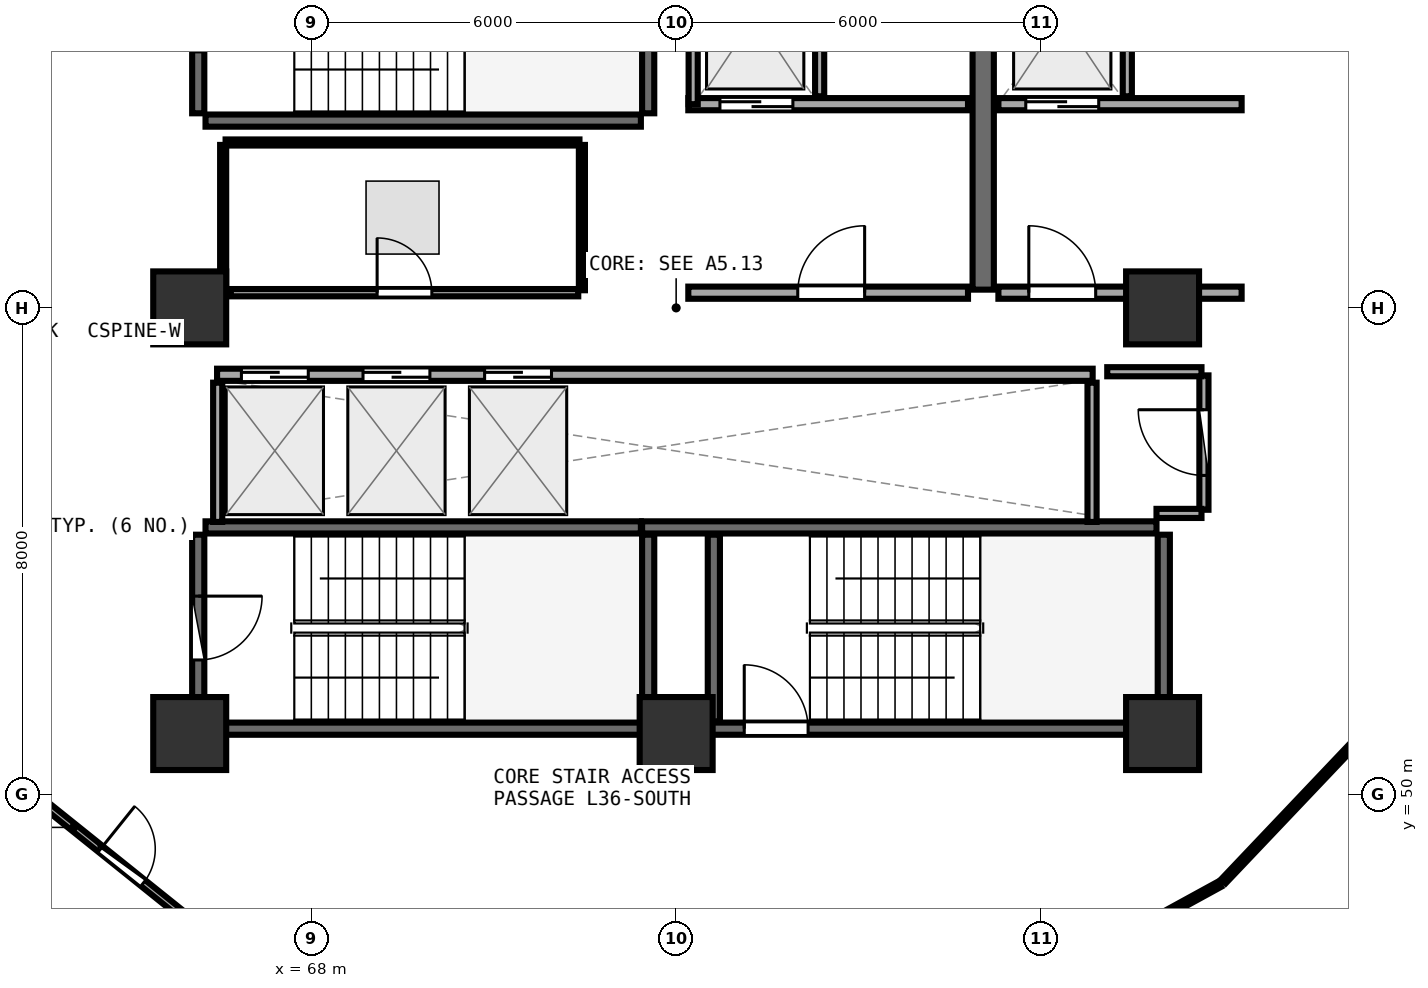
"""IFC4 building model, lengths in metres.
Left out: names, types, materials, properties, quantities, classifications, styles, units other than length and angle.
Written with IfcOpenShell. Run it as: python <this file> out.ifc"""

import sys

from ifc_helpers import new_model, si_unit, direction, frame, frame_2d, origin, origin_2d, place, context, subcontext, project, spatial, rectangle, extrude, element, fill, save


model = new_model("IFC4")
c1 = context("Model", 3, precision=1e-05, world=origin(), true_north=direction((0.0, 1.0)))
c2 = subcontext(c1, "Body", "Model", "MODEL_VIEW")
j1 = project(units=[si_unit("LENGTHUNIT", "METRE"), si_unit("PLANEANGLEUNIT", "RADIAN")], contexts=[c1])
p1 = place(None, origin())
s1 = spatial("IfcSite", under=j1, at=p1, CompositionType="ELEMENT")
p2 = place(p1, origin())
s2 = spatial("IfcBuilding", under=s1, at=p2, CompositionType="ELEMENT")
p3 = place(p2, frame((0.0, 0.0, 143.1)))
s3 = spatial("IfcBuildingStorey", under=s2, at=p3, CompositionType="ELEMENT", Elevation=143.1)
for number, where, z_axis, x_axis in (
    (1, (66.0, 51.0, 0.0), (0.0, 0.0, 1.0), (1.0, 0.0, 0.0)),
    (2, (74.0, 51.0, 0.0), (0.0, 0.0, 1.0), (1.0, 0.0, 0.0)),
    (3, (82.0, 51.0, 0.0), (0.0, 0.0, 1.0), (1.0, 0.0, 0.0)),
    (4, (82.0, 58.0, 0.0), (0.0, 0.0, 1.0), (1.0, 0.0, 0.0)),
    (5, (66.0, 58.0, 0.0), (0.0, 0.0, 1.0), (1.0, 0.0, 0.0)),
):
    element("IfcColumn", number, at=place(p3, frame(where, z_axis=z_axis, x_axis=x_axis)), inside=s3, PredefinedType="PILASTER", context=c2, shape_type="SweptSolid", body=[
        extrude(rectangle(XDim=1.2, YDim=1.2, at=origin_2d()), origin(), (0.0, 0.0, 1.0), 3.75),
    ])
p4 = place(p3, frame((66.26, 61.08, 0.0), z_axis=(0.0, 0.0, 1.0), x_axis=(1.0, 0.0, 0.0)))
e6 = element("IfcWall", 6, at=p4, inside=s3, PredefinedType="SHEAR", context=c2, shape_type="SweptSolid", body=[
    extrude(rectangle(XDim=7.16, YDim=0.2, at=frame_2d((3.58, 0.0))), origin(), (0.0, 0.0, 1.0), 3.49),
])
p5 = place(p3, frame((73.54, 61.2, 0.0), z_axis=(0.0, 0.0, 1.0), x_axis=(0.0, 1.0, 0.0)))
e7 = element("IfcWall", 7, at=p5, inside=s3, PredefinedType="SHEAR", context=c2, shape_type="SweptSolid", body=[
    extrude(rectangle(XDim=3.07, YDim=0.2, at=frame_2d((1.535, 0.0))), origin(), (0.0, 0.0, 1.0), 3.49),
])
p6 = place(p3, frame((66.14, 64.27, 0.0), z_axis=(0.0, 0.0, 1.0), x_axis=(0.0, -1.0, 0.0)))
e8 = element("IfcWall", 8, at=p6, inside=s3, PredefinedType="SHEAR", context=c2, shape_type="SweptSolid", body=[
    extrude(rectangle(XDim=3.07, YDim=0.2, at=frame_2d((1.535, 0.0))), origin(), (0.0, 0.0, 1.0), 3.49),
])
p7 = place(p6, frame((1.01, 0.0, 0.0)))
e9 = element("IfcOpeningElement", 9, at=p7, cuts=e8, PredefinedType="OPENING", context=c2, shape_type="SweptSolid", body=[
    extrude(rectangle(XDim=1.05, YDim=2.1, at=frame_2d((0.525, 1.05))), frame((0.0, 0.11, 0.0), z_axis=(0.0, -1.0, 0.0), x_axis=(1.0, 0.0, 0.0)), (0.0, 0.0, 1.0), 0.22),
])
p8 = place(p3, frame((74.0, 51.08, 0.0), z_axis=(0.0, 0.0, 1.0), x_axis=(1.0, 0.0, 0.0)))
e10 = element("IfcWall", 10, at=p8, inside=s3, PredefinedType="SHEAR", context=c2, shape_type="SweptSolid", body=[
    extrude(rectangle(XDim=7.9, YDim=0.2, at=frame_2d((3.95, 0.0))), origin(), (0.0, 0.0, 1.0), 3.49),
])
p9 = place(p8, frame((1.12, 0.0, 0.0)))
e11 = element("IfcOpeningElement", 11, at=p9, cuts=e10, PredefinedType="OPENING", context=c2, shape_type="SweptSolid", body=[
    extrude(rectangle(XDim=1.05, YDim=2.1, at=frame_2d((0.525, 1.05))), frame((0.0, 0.11, 0.0), z_axis=(0.0, -1.0, 0.0), x_axis=(1.0, 0.0, 0.0)), (0.0, 0.0, 1.0), 0.22),
])
p10 = place(p3, frame((82.02, 51.2, 0.0), z_axis=(0.0, 0.0, 1.0), x_axis=(0.0, 1.0, 0.0)))
e12 = element("IfcWall", 12, at=p10, inside=s3, PredefinedType="SHEAR", context=c2, shape_type="SweptSolid", body=[
    extrude(rectangle(XDim=3.07, YDim=0.2, at=frame_2d((1.535, 0.0))), origin(), (0.0, 0.0, 1.0), 3.49),
])
p11 = place(p3, frame((81.9, 54.39, 0.0), z_axis=(0.0, 0.0, 1.0), x_axis=(-1.0, 0.0, 0.0)))
e13 = element("IfcWall", 13, at=p11, inside=s3, PredefinedType="SHEAR", context=c2, shape_type="SweptSolid", body=[
    extrude(rectangle(XDim=8.46, YDim=0.2, at=frame_2d((4.23, 0.0))), origin(), (0.0, 0.0, 1.0), 3.49),
])
p12 = place(p3, frame((74.62, 54.27, 0.0), z_axis=(0.0, 0.0, 1.0), x_axis=(0.0, -1.0, 0.0)))
e14 = element("IfcWall", 14, at=p12, inside=s3, PredefinedType="SHEAR", context=c2, shape_type="SweptSolid", body=[
    extrude(rectangle(XDim=3.07, YDim=0.2, at=frame_2d((1.535, 0.0))), origin(), (0.0, 0.0, 1.0), 3.49),
])
p13 = place(p3, frame((66.26, 51.08, 0.0), z_axis=(0.0, 0.0, 1.0), x_axis=(1.0, 0.0, 0.0)))
e15 = element("IfcWall", 15, at=p13, inside=s3, PredefinedType="SHEAR", context=c2, shape_type="SweptSolid", body=[
    extrude(rectangle(XDim=7.16, YDim=0.2, at=frame_2d((3.58, 0.0))), origin(), (0.0, 0.0, 1.0), 3.49),
])
p14 = place(p3, frame((73.54, 51.2, 0.0), z_axis=(0.0, 0.0, 1.0), x_axis=(0.0, 1.0, 0.0)))
e16 = element("IfcWall", 16, at=p14, inside=s3, PredefinedType="SHEAR", context=c2, shape_type="SweptSolid", body=[
    extrude(rectangle(XDim=3.07, YDim=0.2, at=frame_2d((1.535, 0.0))), origin(), (0.0, 0.0, 1.0), 3.49),
])
p15 = place(p3, frame((73.42, 54.39, 0.0), z_axis=(0.0, 0.0, 1.0), x_axis=(-1.0, 0.0, 0.0)))
e17 = element("IfcWall", 17, at=p15, inside=s3, PredefinedType="SHEAR", context=c2, shape_type="SweptSolid", body=[
    extrude(rectangle(XDim=7.16, YDim=0.2, at=frame_2d((3.58, 0.0))), origin(), (0.0, 0.0, 1.0), 3.49),
])
p16 = place(p3, frame((66.14, 54.27, 0.0), z_axis=(0.0, 0.0, 1.0), x_axis=(0.0, -1.0, 0.0)))
e18 = element("IfcWall", 18, at=p16, inside=s3, PredefinedType="SHEAR", context=c2, shape_type="SweptSolid", body=[
    extrude(rectangle(XDim=3.07, YDim=0.2, at=frame_2d((1.535, 0.0))), origin(), (0.0, 0.0, 1.0), 3.49),
])
p17 = place(p16, frame((1.01, 0.0, 0.0)))
e19 = element("IfcOpeningElement", 19, at=p17, cuts=e18, PredefinedType="OPENING", context=c2, shape_type="SweptSolid", body=[
    extrude(rectangle(XDim=1.05, YDim=2.1, at=frame_2d((0.525, 1.05))), frame((0.0, 0.11, 0.0), z_axis=(0.0, -1.0, 0.0), x_axis=(1.0, 0.0, 0.0)), (0.0, 0.0, 1.0), 0.22),
])
p18 = place(p3, frame((79.05, 58.3, 0.0), z_axis=(0.0, 0.0, 1.0), x_axis=(0.0, 1.0, 0.0)))
e20 = element("IfcWall", 20, at=p18, inside=s3, PredefinedType="SHEAR", context=c2, shape_type="SweptSolid", body=[
    extrude(rectangle(XDim=6.3, YDim=0.35, at=frame_2d((3.15, 0.0))), origin(), (0.0, 0.0, 1.0), 3.49),
])
p19 = place(p3, frame((74.2, 61.35, 0.0), z_axis=(0.0, 0.0, 1.0), x_axis=(1.0, 0.0, 0.0)))
e21 = element("IfcWall", 21, at=p19, inside=s3, PredefinedType="SOLIDWALL", context=c2, shape_type="SweptSolid", body=[
    extrude(rectangle(XDim=4.6, YDim=0.2, at=frame_2d((2.3, 0.0))), origin(), (0.0, 0.0, 1.0), 3.48),
])
p20 = place(p19, frame((0.52, 0.0, 0.0)))
e22 = element("IfcOpeningElement", 22, at=p20, cuts=e21, PredefinedType="OPENING", context=c2, shape_type="SweptSolid", body=[
    extrude(rectangle(XDim=1.2, YDim=2.15, at=frame_2d((0.6, 1.075))), frame((0.0, 0.11, 0.0), z_axis=(0.0, -1.0, 0.0), x_axis=(1.0, 0.0, 0.0)), (0.0, 0.0, 1.0), 0.22),
])
p21 = place(p3, frame((74.28, 61.35, 0.0), z_axis=(0.0, 0.0, 1.0), x_axis=(0.0, 1.0, 0.0)))
e23 = element("IfcWall", 23, at=p21, inside=s3, PredefinedType="PARTITIONING", context=c2, shape_type="SweptSolid", body=[
    extrude(rectangle(XDim=2.97, YDim=0.15, at=frame_2d((1.485, 0.0))), origin(), (0.0, 0.0, 1.0), 3.48),
])
p22 = place(p3, frame((76.36, 61.48, 0.0), z_axis=(0.0, 0.0, 1.0), x_axis=(0.0, 1.0, 0.0)))
e24 = element("IfcWall", 24, at=p22, inside=s3, PredefinedType="PARTITIONING", context=c2, shape_type="SweptSolid", body=[
    extrude(rectangle(XDim=2.84, YDim=0.15, at=frame_2d((1.42, 0.0))), origin(), (0.0, 0.0, 1.0), 3.48),
])
p23 = place(p3, frame((79.3, 61.35, 0.0), z_axis=(0.0, 0.0, 1.0), x_axis=(1.0, 0.0, 0.0)))
e25 = element("IfcWall", 25, at=p23, inside=s3, PredefinedType="SOLIDWALL", context=c2, shape_type="SweptSolid", body=[
    extrude(rectangle(XDim=4.0, YDim=0.2, at=frame_2d((2.0, 0.0))), origin(), (0.0, 0.0, 1.0), 2.775),
])
p24 = place(p23, frame((0.45, 0.0, 0.0)))
e26 = element("IfcOpeningElement", 26, at=p24, cuts=e25, PredefinedType="OPENING", context=c2, shape_type="SweptSolid", body=[
    extrude(rectangle(XDim=1.2, YDim=2.15, at=frame_2d((0.6, 1.075))), frame((0.0, 0.11, 0.0), z_axis=(0.0, -1.0, 0.0), x_axis=(1.0, 0.0, 0.0)), (0.0, 0.0, 1.0), 0.22),
])
p25 = place(p3, frame((81.42, 61.48, 0.0), z_axis=(0.0, 0.0, 1.0), x_axis=(0.0, 1.0, 0.0)))
e27 = element("IfcWall", 27, at=p25, inside=s3, PredefinedType="PARTITIONING", context=c2, shape_type="SweptSolid", body=[
    extrude(rectangle(XDim=2.84, YDim=0.15, at=frame_2d((1.42, 0.0))), origin(), (0.0, 0.0, 1.0), 3.48),
])
p26 = place(p3, frame((74.2, 58.25, 0.0), z_axis=(0.0, 0.0, 1.0), x_axis=(1.0, 0.0, 0.0)))
e28 = element("IfcWall", 28, at=p26, inside=s3, PredefinedType="SOLIDWALL", context=c2, shape_type="SweptSolid", body=[
    extrude(rectangle(XDim=4.6, YDim=0.2, at=frame_2d((2.3, 0.0))), origin(), (0.0, 0.0, 1.0), 3.48),
])
p27 = place(p26, frame((1.8, 0.0, 0.0)))
e29 = element("IfcOpeningElement", 29, at=p27, cuts=e28, PredefinedType="OPENING", context=c2, shape_type="SweptSolid", body=[
    extrude(rectangle(XDim=1.1, YDim=2.1, at=frame_2d((0.55, 1.05))), frame((0.0, 0.11, 0.0), z_axis=(0.0, -1.0, 0.0), x_axis=(1.0, 0.0, 0.0)), (0.0, 0.0, 1.0), 0.22),
])
p28 = place(p3, frame((79.3, 58.25, 0.0), z_axis=(0.0, 0.0, 1.0), x_axis=(1.0, 0.0, 0.0)))
e30 = element("IfcWall", 30, at=p28, inside=s3, PredefinedType="SOLIDWALL", context=c2, shape_type="SweptSolid", body=[
    extrude(rectangle(XDim=4.0, YDim=0.2, at=frame_2d((2.0, 0.0))), origin(), (0.0, 0.0, 1.0), 2.775),
])
p29 = place(p28, frame((0.5, 0.0, 0.0)))
e31 = element("IfcOpeningElement", 31, at=p29, cuts=e30, PredefinedType="OPENING", context=c2, shape_type="SweptSolid", body=[
    extrude(rectangle(XDim=1.1, YDim=2.1, at=frame_2d((0.55, 1.05))), frame((0.0, 0.11, 0.0), z_axis=(0.0, -1.0, 0.0), x_axis=(1.0, 0.0, 0.0)), (0.0, 0.0, 1.0), 0.22),
])
p30 = place(p3, frame((66.45, 56.9, 0.0), z_axis=(0.0, 0.0, 1.0), x_axis=(1.0, 0.0, 0.0)))
e32 = element("IfcWall", 32, at=p30, inside=s3, PredefinedType="SOLIDWALL", context=c2, shape_type="SweptSolid", body=[
    extrude(rectangle(XDim=14.4, YDim=0.2, at=frame_2d((7.2, 0.0))), origin(), (0.0, 0.0, 1.0), 3.48),
])
p31 = place(p30, frame((0.4, 0.0, 0.0)))
e33 = element("IfcOpeningElement", 33, at=p31, cuts=e32, PredefinedType="OPENING", context=c2, shape_type="SweptSolid", body=[
    extrude(rectangle(XDim=1.1, YDim=2.1, at=frame_2d((0.55, 1.05))), frame((0.0, 0.11, 0.0), z_axis=(0.0, -1.0, 0.0), x_axis=(1.0, 0.0, 0.0)), (0.0, 0.0, 1.0), 0.22),
])
p32 = place(p30, frame((2.4, 0.0, 0.0)))
e34 = element("IfcOpeningElement", 34, at=p32, cuts=e32, PredefinedType="OPENING", context=c2, shape_type="SweptSolid", body=[
    extrude(rectangle(XDim=1.1, YDim=2.1, at=frame_2d((0.55, 1.05))), frame((0.0, 0.11, 0.0), z_axis=(0.0, -1.0, 0.0), x_axis=(1.0, 0.0, 0.0)), (0.0, 0.0, 1.0), 0.22),
])
p33 = place(p30, frame((4.4, 0.0, 0.0)))
e35 = element("IfcOpeningElement", 35, at=p33, cuts=e32, PredefinedType="OPENING", context=c2, shape_type="SweptSolid", body=[
    extrude(rectangle(XDim=1.1, YDim=2.1, at=frame_2d((0.55, 1.05))), frame((0.0, 0.11, 0.0), z_axis=(0.0, -1.0, 0.0), x_axis=(1.0, 0.0, 0.0)), (0.0, 0.0, 1.0), 0.22),
])
for number, where, z_axis, x_axis in (
    (36, (66.46, 54.48, 0.0), (0.0, 0.0, 1.0), (0.0, 1.0, 0.0)),
    (37, (80.84, 54.48, 0.0), (0.0, 0.0, 1.0), (0.0, 1.0, 0.0)),
):
    element("IfcWall", number, at=place(p3, frame(where, z_axis=z_axis, x_axis=x_axis)), inside=s3, PredefinedType="PARTITIONING", context=c2, shape_type="SweptSolid", body=[
        extrude(rectangle(XDim=2.29, YDim=0.15, at=frame_2d((1.145, 0.0))), origin(), (0.0, 0.0, 1.0), 3.48),
    ])
p34 = place(p3, frame((82.68, 54.68, 0.0), z_axis=(0.0, 0.0, 1.0), x_axis=(0.0, 1.0, 0.0)))
e38 = element("IfcWall", 38, at=p34, inside=s3, PredefinedType="PARTITIONING", context=c2, shape_type="SweptSolid", body=[
    extrude(rectangle(XDim=2.21, YDim=0.15, at=frame_2d((1.105, 0.0))), origin(), (0.0, 0.0, 1.0), 3.48),
])
p35 = place(p34, frame((0.565, 0.0, 0.0)))
e39 = element("IfcOpeningElement", 39, at=p35, cuts=e38, PredefinedType="OPENING", context=c2, shape_type="SweptSolid", body=[
    extrude(rectangle(XDim=1.08, YDim=2.1, at=frame_2d((0.54, 1.05))), frame((0.0, 0.085, 0.0), z_axis=(0.0, -1.0, 0.0), x_axis=(1.0, 0.0, 0.0)), (0.0, 0.0, 1.0), 0.17),
])
p36 = place(p3, frame((66.675, 58.25, 0.0), z_axis=(0.0, 0.0, 1.0), x_axis=(1.0, 0.0, 0.0)))
e40 = element("IfcWall", 40, at=p36, inside=s3, PredefinedType="PARTITIONING", context=c2, shape_type="SweptSolid", body=[
    extrude(rectangle(XDim=5.715, YDim=0.12, at=frame_2d((2.857, 0.0))), origin(), (0.0, 0.0, 1.0), 3.48),
])
p37 = place(p36, frame((2.407, 0.0, 0.0)))
e41 = element("IfcOpeningElement", 41, at=p37, cuts=e40, PredefinedType="OPENING", context=c2, shape_type="SweptSolid", body=[
    extrude(rectangle(XDim=0.9, YDim=2.08, at=frame_2d((0.45, 1.04))), frame((0.0, 0.07, 0.0), z_axis=(0.0, -1.0, 0.0), x_axis=(1.0, 0.0, 0.0)), (0.0, 0.0, 1.0), 0.14),
])
p38 = place(p3, frame((63.468, 49.957, 0.0), z_axis=(0.0, 0.0, 1.0), x_axis=(0.78006790059, -0.625694870099, 0.0)))
e42 = element("IfcWall", 42, at=p38, inside=s3, PredefinedType="PARTITIONING", context=c2, shape_type="SweptSolid", body=[
    extrude(rectangle(XDim=3.631, YDim=0.12, at=frame_2d((1.815, 0.0))), origin(), (0.0, 0.0, 1.0), 2.975),
])
p39 = place(p38, frame((1.366, 0.0, 0.0)))
e43 = element("IfcOpeningElement", 43, at=p39, cuts=e42, PredefinedType="OPENING", context=c2, shape_type="SweptSolid", body=[
    extrude(rectangle(XDim=0.9, YDim=2.08, at=frame_2d((0.45, 1.04))), frame((0.0, 0.07, 0.0), z_axis=(0.0, -1.0, 0.0), x_axis=(1.0, 0.0, 0.0)), (0.0, 0.0, 1.0), 0.14),
])
p40 = place(p3, frame((81.9, 54.62, 0.0), z_axis=(0.0, 0.0, 1.0), x_axis=(1.0, 0.0, 0.0)))
e44 = element("IfcWall", 44, at=p40, inside=s3, PredefinedType="PARTITIONING", context=c2, shape_type="SweptSolid", body=[
    extrude(rectangle(XDim=0.74, YDim=0.15, at=frame_2d((0.37, 0.0))), origin(), (0.0, 0.0, 1.0), 2.775),
])
p41 = place(p3, frame((82.64, 56.95, 0.0), z_axis=(0.0, 0.0, 1.0), x_axis=(-1.0, 0.0, 0.0)))
e45 = element("IfcWall", 45, at=p41, inside=s3, PredefinedType="PARTITIONING", context=c2, shape_type="SweptSolid", body=[
    extrude(rectangle(XDim=1.55, YDim=0.15, at=frame_2d((0.775, 0.0))), origin(), (0.0, 0.0, 1.0), 2.775),
])
p42 = place(p3, frame((72.45, 58.29, 0.0), z_axis=(0.0, 0.0, 1.0), x_axis=(0.0, 1.0, 0.0)))
e46 = element("IfcWall", 46, at=p42, inside=s3, PredefinedType="PARTITIONING", context=c2, shape_type="SweptSolid", body=[
    extrude(rectangle(XDim=2.39, YDim=0.1, at=frame_2d((1.195, 0.0))), origin(), (0.0, 0.0, 1.0), 3.48),
])
p43 = place(p3, frame((72.41, 60.72, 0.0), z_axis=(0.0, 0.0, 1.0), x_axis=(-1.0, 0.0, 0.0)))
e47 = element("IfcWall", 47, at=p43, inside=s3, PredefinedType="PARTITIONING", context=c2, shape_type="SweptSolid", body=[
    extrude(rectangle(XDim=5.82, YDim=0.1, at=frame_2d((2.91, 0.0))), origin(), (0.0, 0.0, 1.0), 3.48),
])
p44 = place(p3, frame((66.55, 60.68, 0.0), z_axis=(0.0, 0.0, 1.0), x_axis=(0.0, -1.0, 0.0)))
e48 = element("IfcWall", 48, at=p44, inside=s3, PredefinedType="PARTITIONING", context=c2, shape_type="SweptSolid", body=[
    extrude(rectangle(XDim=2.383, YDim=0.1, at=frame_2d((1.191, 0.0))), origin(), (0.0, 0.0, 1.0), 3.48),
])
p45 = place(p3, frame((79.283, 46.519, 0.0), z_axis=(0.0, 0.0, 1.0), x_axis=(0.876994001609, 0.480501322726, 0.0)))
e49 = element("IfcWall", 49, at=p45, inside=s3, PredefinedType="PARTITIONING", context=c2, shape_type="SweptSolid", body=[
    extrude(rectangle(XDim=4.167, YDim=0.1, at=frame_2d((2.084, 0.0))), origin(), (0.0, 0.0, 1.0), 2.975),
])
p46 = place(p3, frame((83.0, 48.57, 0.0), z_axis=(0.0, 0.0, 1.0), x_axis=(0.688528308603, 0.725209465088, 0.0)))
e50 = element("IfcWall", 50, at=p46, inside=s3, PredefinedType="PARTITIONING", context=c2, shape_type="SweptSolid", body=[
    extrude(rectangle(XDim=4.033, YDim=0.1, at=frame_2d((2.017, 0.0))), origin(), (0.0, 0.0, 1.0), 2.975),
])
p47 = place(p3, frame((87.749, 59.227, 0.0), z_axis=(0.0, 0.0, 1.0), x_axis=(-0.431199882011, 0.902256427937, 0.0)))
e51 = element("IfcWall", 51, at=p47, inside=s3, PredefinedType="PARTITIONING", context=c2, shape_type="SweptSolid", body=[
    extrude(rectangle(XDim=7.638, YDim=0.1, at=frame_2d((3.819, 0.0))), origin(), (0.0, 0.0, 1.0), 2.975),
])
p48 = place(p9, origin())
e52 = element("IfcDoor", 52, at=p48, inside=s3, OperationType="SINGLE_SWING_LEFT", PredefinedType="DOOR", context=c2, shape_type="SweptSolid", body=[
    extrude(rectangle(XDim=1.05, YDim=2.1, at=frame_2d((0.525, 1.05))), frame((0.0, 0.025, 0.0), z_axis=(0.0, -1.0, 0.0), x_axis=(1.0, 0.0, 0.0)), (0.0, 0.0, 1.0), 0.05),
])
fill(e11, e52)
p49 = place(p17, origin())
e53 = element("IfcDoor", 53, at=p49, inside=s3, OperationType="SINGLE_SWING_LEFT", PredefinedType="DOOR", context=c2, shape_type="SweptSolid", body=[
    extrude(rectangle(XDim=1.05, YDim=2.1, at=frame_2d((0.525, 1.05))), frame((0.0, 0.025, 0.0), z_axis=(0.0, -1.0, 0.0), x_axis=(1.0, 0.0, 0.0)), (0.0, 0.0, 1.0), 0.05),
])
fill(e19, e53)
p50 = place(p20, origin())
e54 = element("IfcDoor", 54, at=p50, inside=s3, OperationType="DOUBLE_DOOR_SLIDING", PredefinedType="DOOR", context=c2, shape_type="SweptSolid", body=[
    extrude(rectangle(XDim=1.2, YDim=2.15, at=frame_2d((0.6, 1.075))), frame((0.0, 0.025, 0.0), z_axis=(0.0, -1.0, 0.0), x_axis=(1.0, 0.0, 0.0)), (0.0, 0.0, 1.0), 0.05),
])
fill(e22, e54)
p51 = place(p24, origin())
e55 = element("IfcDoor", 55, at=p51, inside=s3, OperationType="DOUBLE_DOOR_SLIDING", PredefinedType="DOOR", context=c2, shape_type="SweptSolid", body=[
    extrude(rectangle(XDim=1.2, YDim=2.15, at=frame_2d((0.6, 1.075))), frame((0.0, 0.025, 0.0), z_axis=(0.0, -1.0, 0.0), x_axis=(1.0, 0.0, 0.0)), (0.0, 0.0, 1.0), 0.05),
])
fill(e26, e55)
p52 = place(p27, frame((1.1, 0.0, 0.0), z_axis=(0.0, 0.0, 1.0), x_axis=(-1.0, 0.0, 0.0)))
e56 = element("IfcDoor", 56, at=p52, inside=s3, OperationType="SINGLE_SWING_LEFT", PredefinedType="DOOR", context=c2, shape_type="SweptSolid", body=[
    extrude(rectangle(XDim=1.1, YDim=2.1, at=frame_2d((0.55, 1.05))), frame((0.0, 0.025, 0.0), z_axis=(0.0, -1.0, 0.0), x_axis=(1.0, 0.0, 0.0)), (0.0, 0.0, 1.0), 0.05),
])
fill(e29, e56)
p53 = place(p29, frame((1.1, 0.0, 0.0), z_axis=(0.0, 0.0, 1.0), x_axis=(-1.0, 0.0, 0.0)))
e57 = element("IfcDoor", 57, at=p53, inside=s3, OperationType="SINGLE_SWING_RIGHT", PredefinedType="DOOR", context=c2, shape_type="SweptSolid", body=[
    extrude(rectangle(XDim=1.1, YDim=2.1, at=frame_2d((0.55, 1.05))), frame((0.0, 0.025, 0.0), z_axis=(0.0, -1.0, 0.0), x_axis=(1.0, 0.0, 0.0)), (0.0, 0.0, 1.0), 0.05),
])
fill(e31, e57)
p54 = place(p31, origin())
e58 = element("IfcDoor", 58, at=p54, inside=s3, OperationType="DOUBLE_DOOR_SLIDING", PredefinedType="DOOR", context=c2, shape_type="SweptSolid", body=[
    extrude(rectangle(XDim=1.1, YDim=2.1, at=frame_2d((0.55, 1.05))), frame((0.0, 0.025, 0.0), z_axis=(0.0, -1.0, 0.0), x_axis=(1.0, 0.0, 0.0)), (0.0, 0.0, 1.0), 0.05),
])
fill(e33, e58)
p55 = place(p32, origin())
e59 = element("IfcDoor", 59, at=p55, inside=s3, OperationType="DOUBLE_DOOR_SLIDING", PredefinedType="DOOR", context=c2, shape_type="SweptSolid", body=[
    extrude(rectangle(XDim=1.1, YDim=2.1, at=frame_2d((0.55, 1.05))), frame((0.0, 0.025, 0.0), z_axis=(0.0, -1.0, 0.0), x_axis=(1.0, 0.0, 0.0)), (0.0, 0.0, 1.0), 0.05),
])
fill(e34, e59)
p56 = place(p33, origin())
e60 = element("IfcDoor", 60, at=p56, inside=s3, OperationType="DOUBLE_DOOR_SLIDING", PredefinedType="DOOR", context=c2, shape_type="SweptSolid", body=[
    extrude(rectangle(XDim=1.1, YDim=2.1, at=frame_2d((0.55, 1.05))), frame((0.0, 0.025, 0.0), z_axis=(0.0, -1.0, 0.0), x_axis=(1.0, 0.0, 0.0)), (0.0, 0.0, 1.0), 0.05),
])
fill(e35, e60)
p57 = place(p35, origin())
e61 = element("IfcDoor", 61, at=p57, inside=s3, OperationType="SINGLE_SWING_RIGHT", PredefinedType="DOOR", context=c2, shape_type="SweptSolid", body=[
    extrude(rectangle(XDim=1.08, YDim=2.1, at=frame_2d((0.54, 1.05))), frame((0.0, 0.025, 0.0), z_axis=(0.0, -1.0, 0.0), x_axis=(1.0, 0.0, 0.0)), (0.0, 0.0, 1.0), 0.05),
])
fill(e39, e61)
p58 = place(p37, origin())
e62 = element("IfcDoor", 62, at=p58, inside=s3, OperationType="SINGLE_SWING_LEFT", PredefinedType="DOOR", context=c2, shape_type="SweptSolid", body=[
    extrude(rectangle(XDim=0.9, YDim=2.08, at=frame_2d((0.45, 1.04))), frame((0.0, 0.025, 0.0), z_axis=(0.0, -1.0, 0.0), x_axis=(1.0, 0.0, 0.0)), (0.0, 0.0, 1.0), 0.05),
])
fill(e41, e62)
p59 = place(p39, origin())
e63 = element("IfcDoor", 63, at=p59, inside=s3, OperationType="SINGLE_SWING_LEFT", PredefinedType="DOOR", context=c2, shape_type="SweptSolid", body=[
    extrude(rectangle(XDim=0.9, YDim=2.08, at=frame_2d((0.45, 1.04))), frame((0.0, 0.025, 0.0), z_axis=(0.0, -1.0, 0.0), x_axis=(1.0, 0.0, 0.0)), (0.0, 0.0, 1.0), 0.05),
])
fill(e43, e63)
save(model, sys.argv[1])
